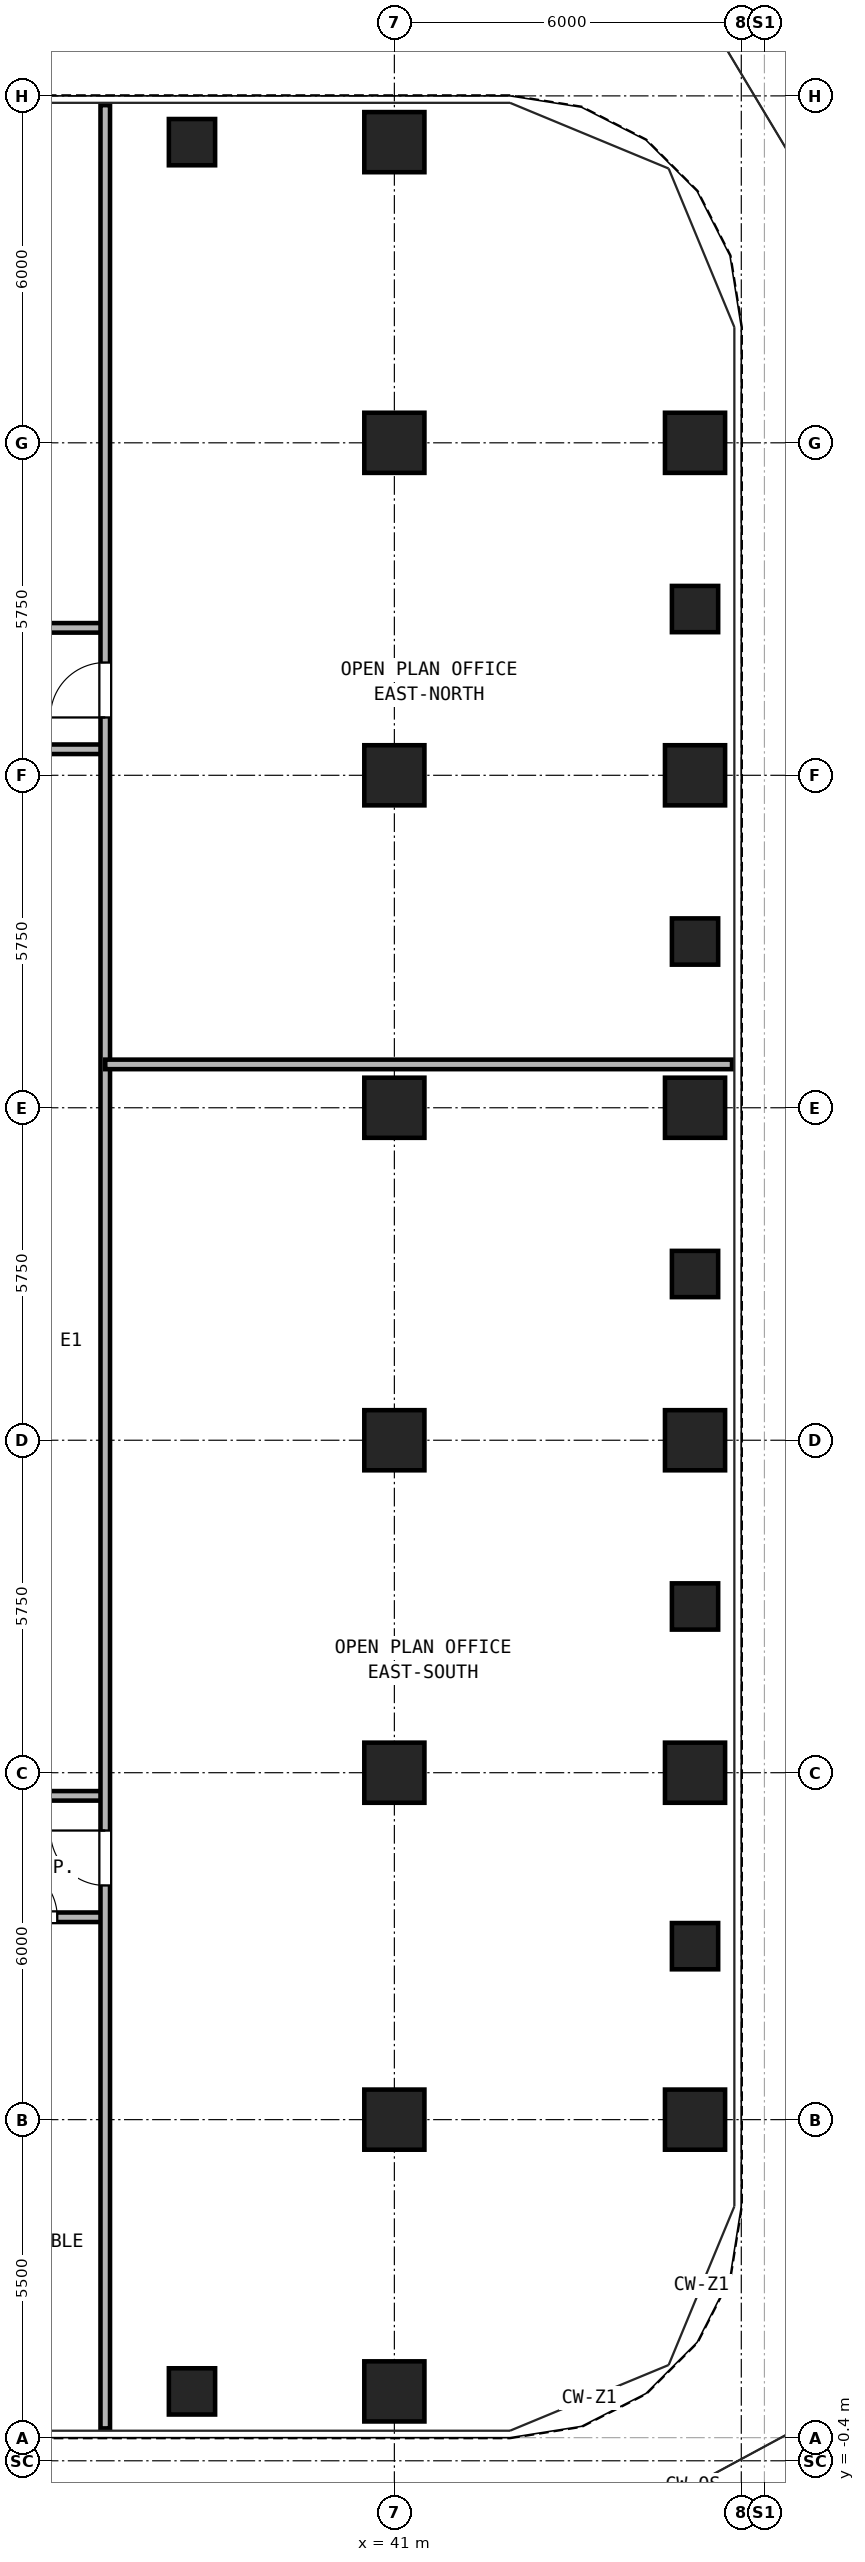
"""IFC4 building model, lengths in metres.
Left out: names, types, materials, properties, quantities, classifications, styles, units other than length and angle.
Written with IfcOpenShell. Run it as: python <this file> out.ifc"""

import sys

from ifc_helpers import new_model, si_unit, direction, frame, frame_2d, origin, origin_2d, place, context, subcontext, project, spatial, rectangle, hollow_rectangle, extrude, source, transform, mapped, element, fill, save


model = new_model("IFC4")
c1 = context("Model", 3, precision=1e-05, world=origin(), true_north=direction((0.0, 1.0)))
c2 = subcontext(c1, "Body", "Model", "MODEL_VIEW")
j1 = project(units=[si_unit("LENGTHUNIT", "METRE"), si_unit("PLANEANGLEUNIT", "RADIAN")], contexts=[c1])
p1 = place(None, origin())
s1 = spatial("IfcSite", under=j1, at=p1, CompositionType="ELEMENT")
p2 = place(p1, origin())
s2 = spatial("IfcBuilding", under=s1, at=p2, CompositionType="ELEMENT")
p3 = place(p2, frame((0.0, 0.0, 72.9)))
s3 = spatial("IfcBuildingStorey", under=s2, at=p3, CompositionType="ELEMENT", Elevation=72.9)
m1 = source(origin(), c2, "Body", "SweptSolid", [
    extrude(hollow_rectangle(XDim=1.04, YDim=1.04, WallThickness=0.065, at=origin_2d()), origin(), (0.0, 0.0, 1.0), 3.24),
])
for number, where, z_axis, x_axis in (
    (1, (41.0, 0.8, 0.0), (0.0, 0.0, 1.0), (1.0, 0.0, 0.0)),
    (2, (41.0, 39.7, 0.0), (0.0, 0.0, 1.0), (1.0, 0.0, 0.0)),
    (3, (46.2, 5.5, 0.0), (0.0, 0.0, 1.0), (1.0, 0.0, 0.0)),
    (4, (46.2, 11.5, 0.0), (0.0, 0.0, 1.0), (1.0, 0.0, 0.0)),
    (5, (46.2, 17.25, 0.0), (0.0, 0.0, 1.0), (1.0, 0.0, 0.0)),
    (6, (46.2, 23.0, 0.0), (0.0, 0.0, 1.0), (1.0, 0.0, 0.0)),
    (7, (46.2, 28.75, 0.0), (0.0, 0.0, 1.0), (1.0, 0.0, 0.0)),
    (8, (46.2, 34.5, 0.0), (0.0, 0.0, 1.0), (1.0, 0.0, 0.0)),
    (9, (41.0, 5.5, 0.0), (0.0, 0.0, 1.0), (1.0, 0.0, 0.0)),
    (10, (41.0, 11.5, 0.0), (0.0, 0.0, 1.0), (1.0, 0.0, 0.0)),
    (11, (41.0, 17.25, 0.0), (0.0, 0.0, 1.0), (1.0, 0.0, 0.0)),
    (12, (41.0, 23.0, 0.0), (0.0, 0.0, 1.0), (1.0, 0.0, 0.0)),
    (13, (41.0, 28.75, 0.0), (0.0, 0.0, 1.0), (1.0, 0.0, 0.0)),
    (14, (41.0, 34.5, 0.0), (0.0, 0.0, 1.0), (1.0, 0.0, 0.0)),
):
    element("IfcColumn", number, at=place(p3, frame(where, z_axis=z_axis, x_axis=x_axis)), inside=s3, PredefinedType="COLUMN", context=c2, shape_type="MappedRepresentation", body=[
        mapped(m1, transform((0.0, 0.0, 0.0), x_axis=(1.0, 0.0, 0.0), y_axis=(0.0, 1.0, 0.0), z_axis=(0.0, 0.0, 1.0), scale=1.0)),
    ])
m2 = source(origin(), c2, "Body", "SweptSolid", [
    extrude(hollow_rectangle(XDim=0.8, YDim=0.8, WallThickness=0.045, at=origin_2d()), origin(), (0.0, 0.0, 1.0), 3.24),
])
for number, where, z_axis, x_axis in (
    (15, (37.5, 0.8, 0.0), (0.0, 0.0, 1.0), (1.0, 0.0, 0.0)),
    (16, (37.5, 39.7, 0.0), (0.0, 0.0, 1.0), (1.0, 0.0, 0.0)),
    (17, (46.2, 8.5, 0.0), (0.0, 0.0, 1.0), (1.0, 0.0, 0.0)),
    (18, (46.2, 14.375, 0.0), (0.0, 0.0, 1.0), (1.0, 0.0, 0.0)),
    (19, (46.2, 20.125, 0.0), (0.0, 0.0, 1.0), (1.0, 0.0, 0.0)),
    (20, (46.2, 25.875, 0.0), (0.0, 0.0, 1.0), (1.0, 0.0, 0.0)),
    (21, (46.2, 31.625, 0.0), (0.0, 0.0, 1.0), (1.0, 0.0, 0.0)),
):
    element("IfcColumn", number, at=place(p3, frame(where, z_axis=z_axis, x_axis=x_axis)), inside=s3, PredefinedType="COLUMN", context=c2, shape_type="MappedRepresentation", body=[
        mapped(m2, transform((0.0, 0.0, 0.0), x_axis=(1.0, 0.0, 0.0), y_axis=(0.0, 1.0, 0.0), z_axis=(0.0, 0.0, 1.0), scale=1.0)),
    ])
p4 = place(p3, frame((11.0, 9.0, 0.0), z_axis=(0.0, 0.0, 1.0), x_axis=(1.0, 0.0, 0.0)))
e22 = element("IfcWall", 22, at=p4, inside=s3, PredefinedType="PARTITIONING", context=c2, shape_type="SweptSolid", body=[
    extrude(rectangle(XDim=25.0, YDim=0.165, at=frame_2d((12.5, 0.0))), origin(), (0.0, 0.0, 1.0), 3.24),
])
p5 = place(p4, frame((2.25, 0.0, 0.0)))
e23 = element("IfcOpeningElement", 23, at=p5, cuts=e22, PredefinedType="OPENING", context=c2, shape_type="SweptSolid", body=[
    extrude(rectangle(XDim=0.95, YDim=2.15, at=frame_2d((0.475, 1.075))), frame((0.0, 0.093, 0.0), z_axis=(0.0, -1.0, 0.0), x_axis=(1.0, 0.0, 0.0)), (0.0, 0.0, 1.0), 0.185),
])
p6 = place(p4, frame((8.0, 0.0, 0.0)))
e24 = element("IfcOpeningElement", 24, at=p6, cuts=e22, PredefinedType="OPENING", context=c2, shape_type="SweptSolid", body=[
    extrude(rectangle(XDim=0.95, YDim=2.15, at=frame_2d((0.475, 1.075))), frame((0.0, 0.093, 0.0), z_axis=(0.0, -1.0, 0.0), x_axis=(1.0, 0.0, 0.0)), (0.0, 0.0, 1.0), 0.185),
])
p7 = place(p4, frame((14.0, 0.0, 0.0)))
e25 = element("IfcOpeningElement", 25, at=p7, cuts=e22, PredefinedType="OPENING", context=c2, shape_type="SweptSolid", body=[
    extrude(rectangle(XDim=0.95, YDim=2.15, at=frame_2d((0.475, 1.075))), frame((0.0, 0.093, 0.0), z_axis=(0.0, -1.0, 0.0), x_axis=(1.0, 0.0, 0.0)), (0.0, 0.0, 1.0), 0.185),
])
p8 = place(p4, frame((19.5, 0.0, 0.0)))
e26 = element("IfcOpeningElement", 26, at=p8, cuts=e22, PredefinedType="OPENING", context=c2, shape_type="SweptSolid", body=[
    extrude(rectangle(XDim=0.95, YDim=2.15, at=frame_2d((0.475, 1.075))), frame((0.0, 0.093, 0.0), z_axis=(0.0, -1.0, 0.0), x_axis=(1.0, 0.0, 0.0)), (0.0, 0.0, 1.0), 0.185),
])
p9 = place(p4, frame((23.25, 0.0, 0.0)))
e27 = element("IfcOpeningElement", 27, at=p9, cuts=e22, PredefinedType="OPENING", context=c2, shape_type="SweptSolid", body=[
    extrude(rectangle(XDim=0.92, YDim=2.1, at=frame_2d((0.46, 1.05))), frame((0.0, 0.093, 0.0), z_axis=(0.0, -1.0, 0.0), x_axis=(1.0, 0.0, 0.0)), (0.0, 0.0, 1.0), 0.185),
])
p10 = place(p3, frame((11.0, 31.3, 0.0), z_axis=(0.0, 0.0, 1.0), x_axis=(1.0, 0.0, 0.0)))
e28 = element("IfcWall", 28, at=p10, inside=s3, PredefinedType="PARTITIONING", context=c2, shape_type="SweptSolid", body=[
    extrude(rectangle(XDim=25.0, YDim=0.165, at=frame_2d((12.5, 0.0))), origin(), (0.0, 0.0, 1.0), 3.24),
])
p11 = place(p10, frame((4.25, 0.0, 0.0)))
e29 = element("IfcOpeningElement", 29, at=p11, cuts=e28, PredefinedType="OPENING", context=c2, shape_type="SweptSolid", body=[
    extrude(rectangle(XDim=0.95, YDim=2.15, at=frame_2d((0.475, 1.075))), frame((0.0, 0.093, 0.0), z_axis=(0.0, -1.0, 0.0), x_axis=(1.0, 0.0, 0.0)), (0.0, 0.0, 1.0), 0.185),
])
p12 = place(p10, frame((12.0, 0.0, 0.0)))
e30 = element("IfcOpeningElement", 30, at=p12, cuts=e28, PredefinedType="OPENING", context=c2, shape_type="SweptSolid", body=[
    extrude(rectangle(XDim=0.95, YDim=2.15, at=frame_2d((0.475, 1.075))), frame((0.0, 0.093, 0.0), z_axis=(0.0, -1.0, 0.0), x_axis=(1.0, 0.0, 0.0)), (0.0, 0.0, 1.0), 0.185),
])
p13 = place(p10, frame((17.5, 0.0, 0.0)))
e31 = element("IfcOpeningElement", 31, at=p13, cuts=e28, PredefinedType="OPENING", context=c2, shape_type="SweptSolid", body=[
    extrude(rectangle(XDim=0.95, YDim=2.15, at=frame_2d((0.475, 1.075))), frame((0.0, 0.093, 0.0), z_axis=(0.0, -1.0, 0.0), x_axis=(1.0, 0.0, 0.0)), (0.0, 0.0, 1.0), 0.185),
])
p14 = place(p10, frame((22.25, 0.0, 0.0)))
e32 = element("IfcOpeningElement", 32, at=p14, cuts=e28, PredefinedType="OPENING", context=c2, shape_type="SweptSolid", body=[
    extrude(rectangle(XDim=0.95, YDim=2.15, at=frame_2d((0.475, 1.075))), frame((0.0, 0.093, 0.0), z_axis=(0.0, -1.0, 0.0), x_axis=(1.0, 0.0, 0.0)), (0.0, 0.0, 1.0), 0.185),
])
for number, where, z_axis, x_axis in (
    (33, (30.7, 11.1, 0.0), (0.0, 0.0, 1.0), (1.0, 0.0, 0.0)),
    (34, (30.7, 29.2, 0.0), (0.0, 0.0, 1.0), (1.0, 0.0, 0.0)),
):
    element("IfcWall", number, at=place(p3, frame(where, z_axis=z_axis, x_axis=x_axis)), inside=s3, PredefinedType="PARTITIONING", context=c2, shape_type="SweptSolid", body=[
        extrude(rectangle(XDim=5.3, YDim=0.165, at=frame_2d((2.65, 0.0))), origin(), (0.0, 0.0, 1.0), 3.24),
    ])
p15 = place(p3, frame((36.0, 0.16, 0.0), z_axis=(0.0, 0.0, 1.0), x_axis=(0.0, 1.0, 0.0)))
e35 = element("IfcWall", 35, at=p15, inside=s3, PredefinedType="PARTITIONING", context=c2, shape_type="SweptSolid", body=[
    extrude(rectangle(XDim=40.18, YDim=0.165, at=frame_2d((20.09, 0.0))), origin(), (0.0, 0.0, 1.0), 3.24),
])
p16 = place(p15, frame((9.39, 0.0, 0.0)))
e36 = element("IfcOpeningElement", 36, at=p16, cuts=e35, PredefinedType="OPENING", context=c2, shape_type="SweptSolid", body=[
    extrude(rectangle(XDim=0.95, YDim=2.15, at=frame_2d((0.475, 1.075))), frame((0.0, 0.093, 0.0), z_axis=(0.0, -1.0, 0.0), x_axis=(1.0, 0.0, 0.0)), (0.0, 0.0, 1.0), 0.185),
])
p17 = place(p15, frame((29.59, 0.0, 0.0)))
e37 = element("IfcOpeningElement", 37, at=p17, cuts=e35, PredefinedType="OPENING", context=c2, shape_type="SweptSolid", body=[
    extrude(rectangle(XDim=0.95, YDim=2.15, at=frame_2d((0.475, 1.075))), frame((0.0, 0.093, 0.0), z_axis=(0.0, -1.0, 0.0), x_axis=(1.0, 0.0, 0.0)), (0.0, 0.0, 1.0), 0.185),
])
p18 = place(p3, frame((36.0, 23.75, 0.0), z_axis=(0.0, 0.0, 1.0), x_axis=(1.0, 0.0, 0.0)))
e38 = element("IfcWall", 38, at=p18, inside=s3, PredefinedType="PARTITIONING", context=c2, shape_type="SweptSolid", body=[
    extrude(rectangle(XDim=10.84, YDim=0.165, at=frame_2d((5.42, 0.0))), origin(), (0.0, 0.0, 1.0), 3.24),
])
p19 = place(p9, frame((0.92, 0.0, 0.0), z_axis=(0.0, 0.0, 1.0), x_axis=(-1.0, 0.0, 0.0)))
e39 = element("IfcDoor", 39, at=p19, inside=s3, OperationType="SINGLE_SWING_LEFT", PredefinedType="DOOR", context=c2, shape_type="SweptSolid", body=[
    extrude(rectangle(XDim=0.92, YDim=2.1, at=frame_2d((0.46, 1.05))), frame((0.0, 0.025, 0.0), z_axis=(0.0, -1.0, 0.0), x_axis=(1.0, 0.0, 0.0)), (0.0, 0.0, 1.0), 0.05),
])
fill(e27, e39)
p20 = place(p16, origin())
e40 = element("IfcDoor", 40, at=p20, inside=s3, OperationType="SINGLE_SWING_RIGHT", PredefinedType="DOOR", context=c2, shape_type="SweptSolid", body=[
    extrude(rectangle(XDim=0.95, YDim=2.15, at=frame_2d((0.475, 1.075))), frame((0.0, 0.025, 0.0), z_axis=(0.0, -1.0, 0.0), x_axis=(1.0, 0.0, 0.0)), (0.0, 0.0, 1.0), 0.05),
])
fill(e36, e40)
p21 = place(p17, origin())
e41 = element("IfcDoor", 41, at=p21, inside=s3, OperationType="SINGLE_SWING_LEFT", PredefinedType="DOOR", context=c2, shape_type="SweptSolid", body=[
    extrude(rectangle(XDim=0.95, YDim=2.15, at=frame_2d((0.475, 1.075))), frame((0.0, 0.025, 0.0), z_axis=(0.0, -1.0, 0.0), x_axis=(1.0, 0.0, 0.0)), (0.0, 0.0, 1.0), 0.05),
])
fill(e37, e41)
save(model, sys.argv[1])
